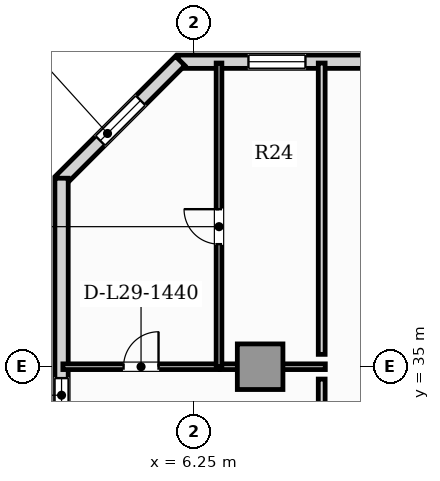
"""IFC4 building model, lengths in metres.
Left out: names, types, materials, properties, quantities, classifications, styles, units other than length and angle.
Written with IfcOpenShell. Run it as: python <this file> out.ifc"""

import sys

from ifc_helpers import new_model, si_unit, direction, frame, frame_2d, origin, origin_2d, place, context, subcontext, project, spatial, rectangle, hollow_rectangle, extrude, element, fill, save


model = new_model("IFC4")
c1 = context("Model", 3, precision=1e-05, world=origin(), true_north=direction((0.0, 1.0)))
c2 = subcontext(c1, "Body", "Model", "MODEL_VIEW")
j1 = project(units=[si_unit("LENGTHUNIT", "METRE"), si_unit("PLANEANGLEUNIT", "RADIAN")], contexts=[c1])
p1 = place(None, origin())
s1 = spatial("IfcSite", under=j1, at=p1, CompositionType="ELEMENT")
p2 = place(p1, origin())
s2 = spatial("IfcBuilding", under=s1, at=p2, CompositionType="ELEMENT")
p3 = place(p2, frame((0.0, 0.0, 119.55)))
s3 = spatial("IfcBuildingStorey", under=s2, at=p3, CompositionType="ELEMENT", Elevation=119.55)
p4 = place(p3, frame((8.0, 35.0, 0.0), z_axis=(0.0, 0.0, 1.0), x_axis=(1.0, 0.0, 0.0)))
e1 = element("IfcColumn", 1, at=p4, inside=s3, PredefinedType="USERDEFINED", context=c2, shape_type="SweptSolid", body=[
    extrude(hollow_rectangle(XDim=1.2, YDim=1.2, WallThickness=0.07, at=origin_2d()), origin(), (0.0, 0.0, 1.0), 3.85),
])
p5 = place(p3, frame((51.66, 43.025, 0.0), z_axis=(0.0, 0.0, 1.0), x_axis=(-1.0, 0.0, 0.0)))
e2 = element("IfcWall", 2, at=p5, inside=s3, PredefinedType="SOLIDWALL", context=c2, shape_type="SweptSolid", body=[
    extrude(rectangle(XDim=45.82, YDim=0.35, at=frame_2d((22.91, 0.0))), origin(), (0.0, 0.0, 1.0), 3.6),
])
p6 = place(p5, frame((42.468, 0.0, 0.9)))
e3 = element("IfcOpeningElement", 3, at=p6, cuts=e2, PredefinedType="OPENING", context=c2, shape_type="SweptSolid", body=[
    extrude(rectangle(XDim=1.5, YDim=1.95, at=frame_2d((0.75, 0.975))), frame((0.0, 0.185, 0.0), z_axis=(0.0, -1.0, 0.0), x_axis=(1.0, 0.0, 0.0)), (0.0, 0.0, 1.0), 0.37),
])
p7 = place(p5, frame((1.853, 0.0, 0.9)))
e4 = element("IfcOpeningElement", 4, at=p7, cuts=e2, PredefinedType="OPENING", context=c2, shape_type="SweptSolid", body=[
    extrude(rectangle(XDim=1.5, YDim=1.95, at=frame_2d((0.75, 0.975))), frame((0.0, 0.185, 0.0), z_axis=(0.0, -1.0, 0.0), x_axis=(1.0, 0.0, 0.0)), (0.0, 0.0, 1.0), 0.37),
])
p8 = place(p5, frame((37.994, 0.0, 0.9)))
e5 = element("IfcOpeningElement", 5, at=p8, cuts=e2, PredefinedType="OPENING", context=c2, shape_type="SweptSolid", body=[
    extrude(rectangle(XDim=0.9, YDim=1.4, at=frame_2d((0.45, 0.7))), frame((0.0, 0.185, 0.0), z_axis=(0.0, -1.0, 0.0), x_axis=(1.0, 0.0, 0.0)), (0.0, 0.0, 1.0), 0.37),
])
p9 = place(p5, frame((34.938, 0.0, 0.95)))
e6 = element("IfcOpeningElement", 6, at=p9, cuts=e2, PredefinedType="OPENING", context=c2, shape_type="SweptSolid", body=[
    extrude(rectangle(XDim=0.9, YDim=1.5, at=frame_2d((0.45, 0.75))), frame((0.0, 0.185, 0.0), z_axis=(0.0, -1.0, 0.0), x_axis=(1.0, 0.0, 0.0)), (0.0, 0.0, 1.0), 0.37),
])
p10 = place(p5, frame((32.207, 0.0, 0.9)))
e7 = element("IfcOpeningElement", 7, at=p10, cuts=e2, PredefinedType="OPENING", context=c2, shape_type="SweptSolid", body=[
    extrude(rectangle(XDim=1.5, YDim=1.95, at=frame_2d((0.75, 0.975))), frame((0.0, 0.185, 0.0), z_axis=(0.0, -1.0, 0.0), x_axis=(1.0, 0.0, 0.0)), (0.0, 0.0, 1.0), 0.37),
])
p11 = place(p5, frame((29.35, 0.0, 0.9)))
e8 = element("IfcOpeningElement", 8, at=p11, cuts=e2, PredefinedType="OPENING", context=c2, shape_type="SweptSolid", body=[
    extrude(rectangle(XDim=1.5, YDim=1.95, at=frame_2d((0.75, 0.975))), frame((0.0, 0.185, 0.0), z_axis=(0.0, -1.0, 0.0), x_axis=(1.0, 0.0, 0.0)), (0.0, 0.0, 1.0), 0.37),
])
p12 = place(p5, frame((26.324, 0.0, 0.9)))
e9 = element("IfcOpeningElement", 9, at=p12, cuts=e2, PredefinedType="OPENING", context=c2, shape_type="SweptSolid", body=[
    extrude(rectangle(XDim=1.5, YDim=1.95, at=frame_2d((0.75, 0.975))), frame((0.0, 0.185, 0.0), z_axis=(0.0, -1.0, 0.0), x_axis=(1.0, 0.0, 0.0)), (0.0, 0.0, 1.0), 0.37),
])
p13 = place(p5, frame((23.716, 0.0, 0.9)))
e10 = element("IfcOpeningElement", 10, at=p13, cuts=e2, PredefinedType="OPENING", context=c2, shape_type="SweptSolid", body=[
    extrude(rectangle(XDim=1.5, YDim=1.95, at=frame_2d((0.75, 0.975))), frame((0.0, 0.185, 0.0), z_axis=(0.0, -1.0, 0.0), x_axis=(1.0, 0.0, 0.0)), (0.0, 0.0, 1.0), 0.37),
])
p14 = place(p5, frame((21.11, 0.0, 0.9)))
e11 = element("IfcOpeningElement", 11, at=p14, cuts=e2, PredefinedType="OPENING", context=c2, shape_type="SweptSolid", body=[
    extrude(rectangle(XDim=1.5, YDim=1.95, at=frame_2d((0.75, 0.975))), frame((0.0, 0.185, 0.0), z_axis=(0.0, -1.0, 0.0), x_axis=(1.0, 0.0, 0.0)), (0.0, 0.0, 1.0), 0.37),
])
p15 = place(p5, frame((18.687, 0.0, 0.9)))
e12 = element("IfcOpeningElement", 12, at=p15, cuts=e2, PredefinedType="OPENING", context=c2, shape_type="SweptSolid", body=[
    extrude(rectangle(XDim=1.5, YDim=1.95, at=frame_2d((0.75, 0.975))), frame((0.0, 0.185, 0.0), z_axis=(0.0, -1.0, 0.0), x_axis=(1.0, 0.0, 0.0)), (0.0, 0.0, 1.0), 0.37),
])
p16 = place(p5, frame((16.594, 0.0, 0.9)))
e13 = element("IfcOpeningElement", 13, at=p16, cuts=e2, PredefinedType="OPENING", context=c2, shape_type="SweptSolid", body=[
    extrude(rectangle(XDim=1.5, YDim=1.95, at=frame_2d((0.75, 0.975))), frame((0.0, 0.185, 0.0), z_axis=(0.0, -1.0, 0.0), x_axis=(1.0, 0.0, 0.0)), (0.0, 0.0, 1.0), 0.37),
])
p17 = place(p5, frame((14.435, 0.0, 0.9)))
e14 = element("IfcOpeningElement", 14, at=p17, cuts=e2, PredefinedType="OPENING", context=c2, shape_type="SweptSolid", body=[
    extrude(rectangle(XDim=1.5, YDim=1.95, at=frame_2d((0.75, 0.975))), frame((0.0, 0.185, 0.0), z_axis=(0.0, -1.0, 0.0), x_axis=(1.0, 0.0, 0.0)), (0.0, 0.0, 1.0), 0.37),
])
p18 = place(p5, frame((11.725, 0.0, 0.9)))
e15 = element("IfcOpeningElement", 15, at=p18, cuts=e2, PredefinedType="OPENING", context=c2, shape_type="SweptSolid", body=[
    extrude(rectangle(XDim=1.5, YDim=1.95, at=frame_2d((0.75, 0.975))), frame((0.0, 0.185, 0.0), z_axis=(0.0, -1.0, 0.0), x_axis=(1.0, 0.0, 0.0)), (0.0, 0.0, 1.0), 0.37),
])
p19 = place(p5, frame((8.906, 0.0, 0.9)))
e16 = element("IfcOpeningElement", 16, at=p19, cuts=e2, PredefinedType="OPENING", context=c2, shape_type="SweptSolid", body=[
    extrude(rectangle(XDim=1.5, YDim=1.95, at=frame_2d((0.75, 0.975))), frame((0.0, 0.185, 0.0), z_axis=(0.0, -1.0, 0.0), x_axis=(1.0, 0.0, 0.0)), (0.0, 0.0, 1.0), 0.37),
])
p20 = place(p5, frame((6.476, 0.0, 0.9)))
e17 = element("IfcOpeningElement", 17, at=p20, cuts=e2, PredefinedType="OPENING", context=c2, shape_type="SweptSolid", body=[
    extrude(rectangle(XDim=1.5, YDim=1.95, at=frame_2d((0.75, 0.975))), frame((0.0, 0.185, 0.0), z_axis=(0.0, -1.0, 0.0), x_axis=(1.0, 0.0, 0.0)), (0.0, 0.0, 1.0), 0.37),
])
p21 = place(p3, frame((5.896, 43.048, 0.0), z_axis=(0.0, 0.0, 1.0), x_axis=(-0.707106781187, -0.707106781187, 0.0)))
e18 = element("IfcWall", 18, at=p21, inside=s3, PredefinedType="SOLIDWALL", context=c2, shape_type="SweptSolid", body=[
    extrude(rectangle(XDim=4.446, YDim=0.35, at=frame_2d((2.223, 0.0))), origin(), (0.0, 0.0, 1.0), 3.6),
])
p22 = place(p21, frame((1.473, 0.0, 0.9)))
e19 = element("IfcOpeningElement", 19, at=p22, cuts=e18, PredefinedType="OPENING", context=c2, shape_type="SweptSolid", body=[
    extrude(rectangle(XDim=1.5, YDim=1.95, at=frame_2d((0.75, 0.975))), frame((0.0, 0.185, 0.0), z_axis=(0.0, -1.0, 0.0), x_axis=(1.0, 0.0, 0.0)), (0.0, 0.0, 1.0), 0.37),
])
p23 = place(p3, frame((2.775, 39.96, 0.0), z_axis=(0.0, 0.0, 1.0), x_axis=(0.0, -1.0, 0.0)))
e20 = element("IfcWall", 20, at=p23, inside=s3, PredefinedType="SOLIDWALL", context=c2, shape_type="SweptSolid", body=[
    extrude(rectangle(XDim=9.97, YDim=0.35, at=frame_2d((4.985, 0.0))), origin(), (0.0, 0.0, 1.0), 3.6),
])
p24 = place(p23, frame((5.26, 0.0, 0.95)))
e21 = element("IfcOpeningElement", 21, at=p24, cuts=e20, PredefinedType="OPENING", context=c2, shape_type="SweptSolid", body=[
    extrude(rectangle(XDim=0.9, YDim=1.5, at=frame_2d((0.45, 0.75))), frame((0.0, 0.185, 0.0), z_axis=(0.0, -1.0, 0.0), x_axis=(1.0, 0.0, 0.0)), (0.0, 0.0, 1.0), 0.37),
])
p25 = place(p3, frame((2.81, 35.0, 0.0), z_axis=(0.0, 0.0, 1.0), x_axis=(1.0, 0.0, 0.0)))
e22 = element("IfcWall", 22, at=p25, inside=s3, PredefinedType="PARTITIONING", context=c2, shape_type="SweptSolid", body=[
    extrude(rectangle(XDim=4.113, YDim=0.15, at=frame_2d((2.057, 0.0))), origin(), (0.0, 0.0, 1.0), 3.6),
])
p26 = place(p25, frame((1.597, 0.0, 0.0)))
e23 = element("IfcOpeningElement", 23, at=p26, cuts=e22, PredefinedType="OPENING", context=c2, shape_type="SweptSolid", body=[
    extrude(rectangle(XDim=0.92, YDim=2.1, at=frame_2d((0.46, 1.05))), frame((0.0, 0.085, 0.0), z_axis=(0.0, -1.0, 0.0), x_axis=(1.0, 0.0, 0.0)), (0.0, 0.0, 1.0), 0.17),
])
p27 = place(p3, frame((6.953, 35.0, 0.0), z_axis=(0.0, 0.0, 1.0), x_axis=(1.0, 0.0, 0.0)))
e24 = element("IfcWall", 24, at=p27, inside=s3, PredefinedType="PARTITIONING", context=c2, shape_type="SweptSolid", body=[
    extrude(rectangle(XDim=2.762, YDim=0.15, at=frame_2d((1.381, 0.0))), origin(), (0.0, 0.0, 1.0), 2.983),
])
p28 = place(p3, frame((6.918, 34.995, 0.0), z_axis=(0.0, 0.0, 1.0), x_axis=(0.0, 1.0, 0.0)))
e25 = element("IfcWall", 25, at=p28, inside=s3, PredefinedType="PARTITIONING", context=c2, shape_type="SweptSolid", body=[
    extrude(rectangle(XDim=7.995, YDim=0.15, at=frame_2d((3.998, 0.0))), origin(), (0.0, 0.0, 1.0), 3.6),
])
p29 = place(p28, frame((3.23, 0.0, 0.0)))
e26 = element("IfcOpeningElement", 26, at=p29, cuts=e25, PredefinedType="OPENING", context=c2, shape_type="SweptSolid", body=[
    extrude(rectangle(XDim=0.92, YDim=2.1, at=frame_2d((0.46, 1.05))), frame((0.0, 0.085, 0.0), z_axis=(0.0, -1.0, 0.0), x_axis=(1.0, 0.0, 0.0)), (0.0, 0.0, 1.0), 0.17),
])
p30 = place(p3, frame((9.62, 34.675, 0.0), z_axis=(0.0, 0.0, 1.0), x_axis=(0.0, -1.0, 0.0)))
e27 = element("IfcWall", 27, at=p30, inside=s3, PredefinedType="PARTITIONING", context=c2, shape_type="SweptSolid", body=[
    extrude(rectangle(XDim=1.18, YDim=0.18, at=frame_2d((0.59, 0.0))), origin(), (0.0, 0.0, 1.0), 3.6),
])
p31 = place(p3, frame((9.62, 42.99, 0.0), z_axis=(0.0, 0.0, 1.0), x_axis=(0.0, -1.0, 0.0)))
e28 = element("IfcWall", 28, at=p31, inside=s3, PredefinedType="PARTITIONING", context=c2, shape_type="SweptSolid", body=[
    extrude(rectangle(XDim=7.665, YDim=0.18, at=frame_2d((3.833, 0.0))), origin(), (0.0, 0.0, 1.0), 3.6),
])
p32 = place(p24, origin())
e29 = element("IfcWindow", 29, at=p32, inside=s3, PartitioningType="SINGLE_PANEL", PredefinedType="WINDOW", context=c2, shape_type="SweptSolid", body=[
    extrude(rectangle(XDim=0.9, YDim=1.5, at=frame_2d((0.45, 0.75))), frame((0.0, 0.03, 0.0), z_axis=(0.0, -1.0, 0.0), x_axis=(1.0, 0.0, 0.0)), (0.0, 0.0, 1.0), 0.06),
])
fill(e21, e29)
p33 = place(p22, origin())
e30 = element("IfcWindow", 30, at=p33, inside=s3, PartitioningType="SINGLE_PANEL", PredefinedType="WINDOW", context=c2, shape_type="SweptSolid", body=[
    extrude(rectangle(XDim=1.5, YDim=1.95, at=frame_2d((0.75, 0.975))), frame((0.0, 0.03, 0.0), z_axis=(0.0, -1.0, 0.0), x_axis=(1.0, 0.0, 0.0)), (0.0, 0.0, 1.0), 0.06),
])
fill(e19, e30)
p34 = place(p6, origin())
e31 = element("IfcWindow", 31, at=p34, inside=s3, PartitioningType="SINGLE_PANEL", PredefinedType="WINDOW", context=c2, shape_type="SweptSolid", body=[
    extrude(rectangle(XDim=1.5, YDim=1.95, at=frame_2d((0.75, 0.975))), frame((0.0, 0.03, 0.0), z_axis=(0.0, -1.0, 0.0), x_axis=(1.0, 0.0, 0.0)), (0.0, 0.0, 1.0), 0.06),
])
fill(e3, e31)
p35 = place(p26, origin())
e32 = element("IfcDoor", 32, at=p35, inside=s3, OperationType="SINGLE_SWING_RIGHT", PredefinedType="DOOR", context=c2, shape_type="SweptSolid", body=[
    extrude(rectangle(XDim=0.92, YDim=2.1, at=frame_2d((0.46, 1.05))), frame((0.0, 0.025, 0.0), z_axis=(0.0, -1.0, 0.0), x_axis=(1.0, 0.0, 0.0)), (0.0, 0.0, 1.0), 0.05),
])
fill(e23, e32)
p36 = place(p29, origin())
e33 = element("IfcDoor", 33, at=p36, inside=s3, OperationType="SINGLE_SWING_RIGHT", PredefinedType="DOOR", context=c2, shape_type="SweptSolid", body=[
    extrude(rectangle(XDim=0.92, YDim=2.1, at=frame_2d((0.46, 1.05))), frame((0.0, 0.025, 0.0), z_axis=(0.0, -1.0, 0.0), x_axis=(1.0, 0.0, 0.0)), (0.0, 0.0, 1.0), 0.05),
])
fill(e26, e33)
save(model, sys.argv[1])
